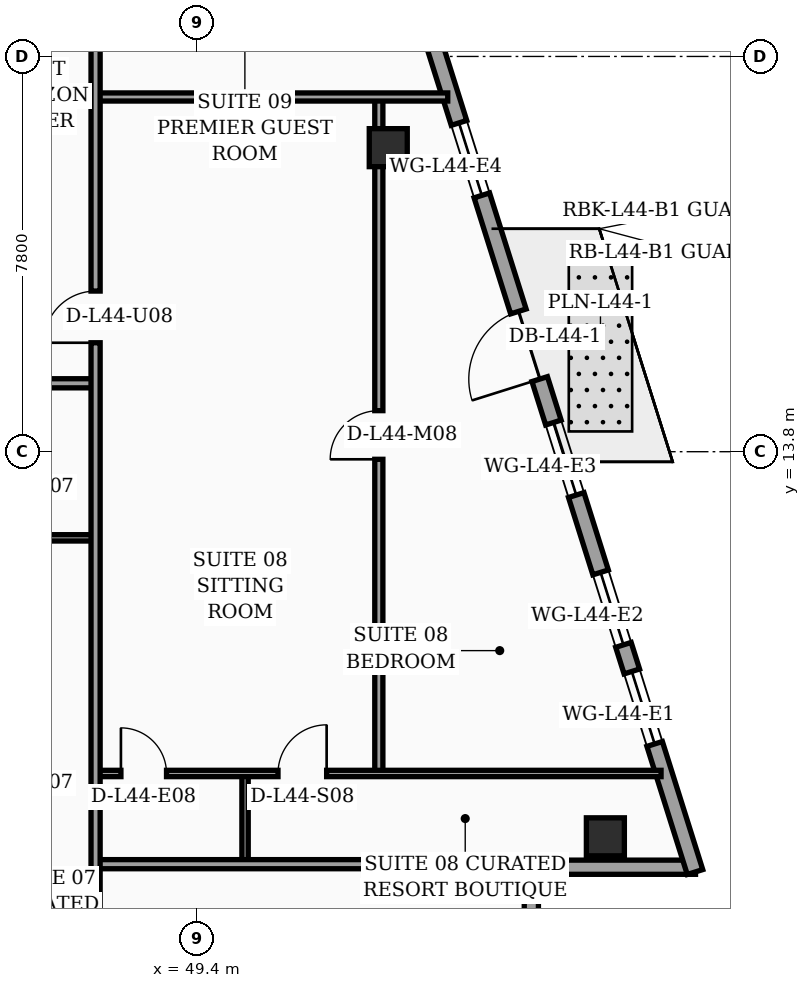
"""IFC4 building model, lengths in metres.
Left out: names, types, materials, properties, quantities, classifications, styles, units other than length and angle.
Written with IfcOpenShell. Run it as: python <this file> out.ifc"""

import sys

from ifc_helpers import new_model, si_unit, direction, frame, frame_2d, origin, origin_2d, place, context, subcontext, project, spatial, rectangle, hollow_rectangle, extrude, element, fill, save


model = new_model("IFC4")
c1 = context("Model", 3, precision=1e-05, world=origin(), true_north=direction((0.0, 1.0)))
c2 = subcontext(c1, "Body", "Model", "MODEL_VIEW")
j1 = project(units=[si_unit("LENGTHUNIT", "METRE"), si_unit("PLANEANGLEUNIT", "RADIAN")], contexts=[c1])
p1 = place(None, origin())
s1 = spatial("IfcSite", under=j1, at=p1, CompositionType="ELEMENT")
p2 = place(p1, origin())
s2 = spatial("IfcBuilding", under=s1, at=p2, CompositionType="ELEMENT")
p3 = place(p2, frame((0.0, 0.0, 178.9)))
s3 = spatial("IfcBuildingStorey", under=s2, at=p3, CompositionType="ELEMENT", Elevation=178.9)
for number, where, z_axis, x_axis in (
    (1, (57.461, 6.2, 0.0), (0.0, 0.0, 1.0), (1.0, 0.0, 0.0)),
    (2, (53.176, 19.8, 0.0), (0.0, 0.0, 1.0), (1.0, 0.0, 0.0)),
):
    element("IfcColumn", number, at=place(p3, frame(where, z_axis=z_axis, x_axis=x_axis)), inside=s3, PredefinedType="COLUMN", context=c2, shape_type="SweptSolid", body=[
        extrude(hollow_rectangle(XDim=0.75, YDim=0.75, WallThickness=0.032, at=origin_2d()), origin(), (0.0, 0.0, 1.0), 3.56),
    ])
p4 = place(p3, frame((56.0, 2.52, 0.0), z_axis=(0.0, 0.0, 1.0), x_axis=(0.0, 1.0, 0.0)))
e3 = element("IfcWall", 3, at=p4, inside=s3, PredefinedType="SOLIDWALL", context=c2, shape_type="SweptSolid", body=[
    extrude(rectangle(XDim=2.94, YDim=0.28, at=frame_2d((1.47, 0.0))), origin(), (0.0, 0.0, 1.0), 3.04),
])
p5 = place(p3, frame((55.86, 5.6, 0.0), z_axis=(0.0, 0.0, 1.0), x_axis=(1.0, 0.0, 0.0)))
e4 = element("IfcWall", 4, at=p5, inside=s3, PredefinedType="SOLIDWALL", context=c2, shape_type="SweptSolid", body=[
    extrude(rectangle(XDim=3.38, YDim=0.28, at=frame_2d((1.69, 0.0))), origin(), (0.0, 0.0, 1.0), 3.04),
])
p6 = place(p3, frame((59.23, 5.505, 0.0), z_axis=(0.0, 0.0, 1.0), x_axis=(-0.300509063924, 0.953778958931, 0.0)))
e5 = element("IfcWall", 5, at=p6, inside=s3, PredefinedType="SOLIDWALL", context=c2, shape_type="SweptSolid", body=[
    extrude(rectangle(XDim=30.814, YDim=0.32, at=frame_2d((15.407, 0.0))), origin(), (0.0, 0.0, 1.0), 3.56),
])
p7 = place(p6, frame((10.199, 0.0, 0.0)))
e6 = element("IfcOpeningElement", 6, at=p7, cuts=e5, PredefinedType="OPENING", context=c2, shape_type="SweptSolid", body=[
    extrude(rectangle(XDim=1.4, YDim=2.25, at=frame_2d((0.7, 1.125))), frame((0.0, 0.17, 0.0), z_axis=(0.0, -1.0, 0.0), x_axis=(1.0, 0.0, 0.0)), (0.0, 0.0, 1.0), 0.34),
])
p8 = place(p6, frame((2.65, 0.0, 0.75)))
e7 = element("IfcOpeningElement", 7, at=p8, cuts=e5, PredefinedType="OPENING", context=c2, shape_type="SweptSolid", body=[
    extrude(rectangle(XDim=1.5, YDim=1.6, at=frame_2d((0.75, 0.8))), frame((0.0, 0.17, 0.0), z_axis=(0.0, -1.0, 0.0), x_axis=(1.0, 0.0, 0.0)), (0.0, 0.0, 1.0), 0.34),
])
p9 = place(p6, frame((4.7, 0.0, 0.75)))
e8 = element("IfcOpeningElement", 8, at=p9, cuts=e5, PredefinedType="OPENING", context=c2, shape_type="SweptSolid", body=[
    extrude(rectangle(XDim=1.5, YDim=1.6, at=frame_2d((0.75, 0.8))), frame((0.0, 0.17, 0.0), z_axis=(0.0, -1.0, 0.0), x_axis=(1.0, 0.0, 0.0)), (0.0, 0.0, 1.0), 0.34),
])
p10 = place(p6, frame((7.8, 0.0, 0.75)))
e9 = element("IfcOpeningElement", 9, at=p10, cuts=e5, PredefinedType="OPENING", context=c2, shape_type="SweptSolid", body=[
    extrude(rectangle(XDim=1.5, YDim=1.6, at=frame_2d((0.75, 0.8))), frame((0.0, 0.17, 0.0), z_axis=(0.0, -1.0, 0.0), x_axis=(1.0, 0.0, 0.0)), (0.0, 0.0, 1.0), 0.34),
])
p11 = place(p6, frame((14.0, 0.0, 0.75)))
e10 = element("IfcOpeningElement", 10, at=p11, cuts=e5, PredefinedType="OPENING", context=c2, shape_type="SweptSolid", body=[
    extrude(rectangle(XDim=1.5, YDim=1.6, at=frame_2d((0.75, 0.8))), frame((0.0, 0.17, 0.0), z_axis=(0.0, -1.0, 0.0), x_axis=(1.0, 0.0, 0.0)), (0.0, 0.0, 1.0), 0.34),
])
p12 = place(p6, frame((17.1, 0.0, 0.75)))
e11 = element("IfcOpeningElement", 11, at=p12, cuts=e5, PredefinedType="OPENING", context=c2, shape_type="SweptSolid", body=[
    extrude(rectangle(XDim=1.5, YDim=1.6, at=frame_2d((0.75, 0.8))), frame((0.0, 0.17, 0.0), z_axis=(0.0, -1.0, 0.0), x_axis=(1.0, 0.0, 0.0)), (0.0, 0.0, 1.0), 0.34),
])
p13 = place(p6, frame((20.2, 0.0, 0.75)))
e12 = element("IfcOpeningElement", 12, at=p13, cuts=e5, PredefinedType="OPENING", context=c2, shape_type="SweptSolid", body=[
    extrude(rectangle(XDim=1.5, YDim=1.6, at=frame_2d((0.75, 0.8))), frame((0.0, 0.17, 0.0), z_axis=(0.0, -1.0, 0.0), x_axis=(1.0, 0.0, 0.0)), (0.0, 0.0, 1.0), 0.34),
])
p14 = place(p6, frame((26.4, 0.0, 0.75)))
e13 = element("IfcOpeningElement", 13, at=p14, cuts=e5, PredefinedType="OPENING", context=c2, shape_type="SweptSolid", body=[
    extrude(rectangle(XDim=1.5, YDim=1.6, at=frame_2d((0.75, 0.8))), frame((0.0, 0.17, 0.0), z_axis=(0.0, -1.0, 0.0), x_axis=(1.0, 0.0, 0.0)), (0.0, 0.0, 1.0), 0.34),
])
p15 = place(p3, frame((45.47, 12.1, 0.0), z_axis=(0.0, 0.0, 1.0), x_axis=(1.0, 0.0, 0.0)))
e14 = element("IfcWall", 14, at=p15, inside=s3, PredefinedType="PARTITIONING", context=c2, shape_type="SweptSolid", body=[
    extrude(rectangle(XDim=1.93, YDim=0.125, at=frame_2d((0.965, 0.0))), origin(), (0.0, 0.0, 1.0), 2.94),
])
p16 = place(p3, frame((32.4, 15.15, 0.0), z_axis=(0.0, 0.0, 1.0), x_axis=(1.0, 0.0, 0.0)))
e15 = element("IfcWall", 15, at=p16, inside=s3, PredefinedType="PARTITIONING", context=c2, shape_type="SweptSolid", body=[
    extrude(rectangle(XDim=15.0, YDim=0.18, at=frame_2d((7.5, 0.0))), origin(), (0.0, 0.0, 1.0), 2.94),
])
p17 = place(p16, frame((1.66, 0.0, 0.0)))
e16 = element("IfcOpeningElement", 16, at=p17, cuts=e15, PredefinedType="OPENING", context=c2, shape_type="SweptSolid", body=[
    extrude(rectangle(XDim=1.02, YDim=2.2, at=frame_2d((0.51, 1.1))), frame((0.0, 0.1, 0.0), z_axis=(0.0, -1.0, 0.0), x_axis=(1.0, 0.0, 0.0)), (0.0, 0.0, 1.0), 0.2),
])
p18 = place(p16, frame((10.79, 0.0, 0.0)))
e17 = element("IfcOpeningElement", 17, at=p18, cuts=e15, PredefinedType="OPENING", context=c2, shape_type="SweptSolid", body=[
    extrude(rectangle(XDim=1.02, YDim=2.2, at=frame_2d((0.51, 1.1))), frame((0.0, 0.1, 0.0), z_axis=(0.0, -1.0, 0.0), x_axis=(1.0, 0.0, 0.0)), (0.0, 0.0, 1.0), 0.2),
])
p19 = place(p16, frame((6.62, 0.0, 0.0)))
e18 = element("IfcOpeningElement", 18, at=p19, cuts=e15, PredefinedType="OPENING", context=c2, shape_type="SweptSolid", body=[
    extrude(rectangle(XDim=1.02, YDim=2.2, at=frame_2d((0.51, 1.1))), frame((0.0, 0.1, 0.0), z_axis=(0.0, -1.0, 0.0), x_axis=(1.0, 0.0, 0.0)), (0.0, 0.0, 1.0), 0.2),
])
p20 = place(p3, frame((50.35, 5.66, 0.0), z_axis=(0.0, 0.0, 1.0), x_axis=(0.0, 1.0, 0.0)))
e19 = element("IfcWall", 19, at=p20, inside=s3, PredefinedType="PARTITIONING", context=c2, shape_type="SweptSolid", body=[
    extrude(rectangle(XDim=1.79, YDim=0.125, at=frame_2d((0.895, 0.0))), origin(), (0.0, 0.0, 1.0), 3.56),
])
p21 = place(p3, frame((52.99, 7.45, 0.0), z_axis=(0.0, 0.0, 1.0), x_axis=(0.0, 1.0, 0.0)))
e20 = element("IfcWall", 20, at=p21, inside=s3, PredefinedType="PARTITIONING", context=c2, shape_type="SweptSolid", body=[
    extrude(rectangle(XDim=13.35, YDim=0.16, at=frame_2d((6.675, 0.0))), origin(), (0.0, 0.0, 1.0), 2.94),
])
p22 = place(p21, frame((6.2, 0.0, 0.0)))
e21 = element("IfcOpeningElement", 21, at=p22, cuts=e20, PredefinedType="OPENING", context=c2, shape_type="SweptSolid", body=[
    extrude(rectangle(XDim=0.96, YDim=2.2, at=frame_2d((0.48, 1.1))), frame((0.0, 0.09, 0.0), z_axis=(0.0, -1.0, 0.0), x_axis=(1.0, 0.0, 0.0)), (0.0, 0.0, 1.0), 0.18),
])
p23 = place(p3, frame((47.4, 7.45, 0.0), z_axis=(0.0, 0.0, 1.0), x_axis=(1.0, 0.0, 0.0)))
e22 = element("IfcWall", 22, at=p23, inside=s3, PredefinedType="PARTITIONING", context=c2, shape_type="SweptSolid", body=[
    extrude(rectangle(XDim=11.16, YDim=0.125, at=frame_2d((5.58, 0.0))), origin(), (0.0, 0.0, 1.0), 2.94),
])
p24 = place(p23, frame((0.5, 0.0, 0.0)))
e23 = element("IfcOpeningElement", 23, at=p24, cuts=e22, PredefinedType="OPENING", context=c2, shape_type="SweptSolid", body=[
    extrude(rectangle(XDim=0.9, YDim=2.15, at=frame_2d((0.45, 1.075))), frame((0.0, 0.073, 0.0), z_axis=(0.0, -1.0, 0.0), x_axis=(1.0, 0.0, 0.0)), (0.0, 0.0, 1.0), 0.145),
])
p25 = place(p23, frame((3.6, 0.0, 0.0)))
e24 = element("IfcOpeningElement", 24, at=p25, cuts=e22, PredefinedType="OPENING", context=c2, shape_type="SweptSolid", body=[
    extrude(rectangle(XDim=0.96, YDim=2.2, at=frame_2d((0.48, 1.1))), frame((0.0, 0.073, 0.0), z_axis=(0.0, -1.0, 0.0), x_axis=(1.0, 0.0, 0.0)), (0.0, 0.0, 1.0), 0.145),
])
p26 = place(p3, frame((47.4, 5.66, 0.0), z_axis=(0.0, 0.0, 1.0), x_axis=(1.0, 0.0, 0.0)))
e25 = element("IfcWall", 25, at=p26, inside=s3, PredefinedType="PARTITIONING", context=c2, shape_type="SweptSolid", body=[
    extrude(rectangle(XDim=8.6, YDim=0.18, at=frame_2d((4.3, 0.0))), origin(), (0.0, 0.0, 1.0), 2.94),
])
p27 = place(p3, frame((47.4, 20.8, 0.0), z_axis=(0.0, 0.0, 1.0), x_axis=(1.0, 0.0, 0.0)))
e26 = element("IfcWall", 26, at=p27, inside=s3, PredefinedType="PARTITIONING", context=c2, shape_type="SweptSolid", body=[
    extrude(rectangle(XDim=6.95, YDim=0.16, at=frame_2d((3.475, 0.0))), origin(), (0.0, 0.0, 1.0), 3.04),
])
p28 = place(p3, frame((47.4, 2.44, 0.0), z_axis=(0.0, 0.0, 1.0), x_axis=(0.0, 1.0, 0.0)))
e27 = element("IfcWall", 27, at=p28, inside=s3, PredefinedType="PARTITIONING", context=c2, shape_type="SweptSolid", body=[
    extrude(rectangle(XDim=27.84, YDim=0.18, at=frame_2d((13.92, 0.0))), origin(), (0.0, 0.0, 1.0), 2.94),
])
p29 = place(p28, frame((13.51, 0.0, 0.0)))
e28 = element("IfcOpeningElement", 28, at=p29, cuts=e27, PredefinedType="OPENING", context=c2, shape_type="SweptSolid", body=[
    extrude(rectangle(XDim=1.02, YDim=2.2, at=frame_2d((0.51, 1.1))), frame((0.0, 0.1, 0.0), z_axis=(0.0, -1.0, 0.0), x_axis=(1.0, 0.0, 0.0)), (0.0, 0.0, 1.0), 0.2),
])
p30 = place(p28, frame((21.52, 0.0, 0.0)))
e29 = element("IfcOpeningElement", 29, at=p30, cuts=e27, PredefinedType="OPENING", context=c2, shape_type="SweptSolid", body=[
    extrude(rectangle(XDim=1.02, YDim=2.2, at=frame_2d((0.51, 1.1))), frame((0.0, 0.1, 0.0), z_axis=(0.0, -1.0, 0.0), x_axis=(1.0, 0.0, 0.0)), (0.0, 0.0, 1.0), 0.2),
])
p31 = place(p7, origin())
e30 = element("IfcDoor", 30, at=p31, inside=s3, OperationType="SINGLE_SWING_LEFT", PredefinedType="DOOR", context=c2, shape_type="SweptSolid", body=[
    extrude(rectangle(XDim=1.4, YDim=2.25, at=frame_2d((0.7, 1.125))), frame((0.0, 0.025, 0.0), z_axis=(0.0, -1.0, 0.0), x_axis=(1.0, 0.0, 0.0)), (0.0, 0.0, 1.0), 0.05),
])
fill(e6, e30)
p32 = place(p8, origin())
e31 = element("IfcWindow", 31, at=p32, inside=s3, PartitioningType="SINGLE_PANEL", PredefinedType="WINDOW", context=c2, shape_type="SweptSolid", body=[
    extrude(rectangle(XDim=1.5, YDim=1.6, at=frame_2d((0.75, 0.8))), frame((0.0, 0.03, 0.0), z_axis=(0.0, -1.0, 0.0), x_axis=(1.0, 0.0, 0.0)), (0.0, 0.0, 1.0), 0.06),
])
fill(e7, e31)
p33 = place(p9, origin())
e32 = element("IfcWindow", 32, at=p33, inside=s3, PartitioningType="SINGLE_PANEL", PredefinedType="WINDOW", context=c2, shape_type="SweptSolid", body=[
    extrude(rectangle(XDim=1.5, YDim=1.6, at=frame_2d((0.75, 0.8))), frame((0.0, 0.03, 0.0), z_axis=(0.0, -1.0, 0.0), x_axis=(1.0, 0.0, 0.0)), (0.0, 0.0, 1.0), 0.06),
])
fill(e8, e32)
p34 = place(p10, origin())
e33 = element("IfcWindow", 33, at=p34, inside=s3, PartitioningType="SINGLE_PANEL", PredefinedType="WINDOW", context=c2, shape_type="SweptSolid", body=[
    extrude(rectangle(XDim=1.5, YDim=1.6, at=frame_2d((0.75, 0.8))), frame((0.0, 0.03, 0.0), z_axis=(0.0, -1.0, 0.0), x_axis=(1.0, 0.0, 0.0)), (0.0, 0.0, 1.0), 0.06),
])
fill(e9, e33)
p35 = place(p11, origin())
e34 = element("IfcWindow", 34, at=p35, inside=s3, PartitioningType="SINGLE_PANEL", PredefinedType="WINDOW", context=c2, shape_type="SweptSolid", body=[
    extrude(rectangle(XDim=1.5, YDim=1.6, at=frame_2d((0.75, 0.8))), frame((0.0, 0.03, 0.0), z_axis=(0.0, -1.0, 0.0), x_axis=(1.0, 0.0, 0.0)), (0.0, 0.0, 1.0), 0.06),
])
fill(e10, e34)
p36 = place(p22, origin())
e35 = element("IfcDoor", 35, at=p36, inside=s3, OperationType="SINGLE_SWING_LEFT", PredefinedType="DOOR", context=c2, shape_type="SweptSolid", body=[
    extrude(rectangle(XDim=0.96, YDim=2.2, at=frame_2d((0.48, 1.1))), frame((0.0, 0.025, 0.0), z_axis=(0.0, -1.0, 0.0), x_axis=(1.0, 0.0, 0.0)), (0.0, 0.0, 1.0), 0.05),
])
fill(e21, e35)
p37 = place(p24, origin())
e36 = element("IfcDoor", 36, at=p37, inside=s3, OperationType="SINGLE_SWING_LEFT", PredefinedType="DOOR", context=c2, shape_type="SweptSolid", body=[
    extrude(rectangle(XDim=0.9, YDim=2.15, at=frame_2d((0.45, 1.075))), frame((0.0, 0.025, 0.0), z_axis=(0.0, -1.0, 0.0), x_axis=(1.0, 0.0, 0.0)), (0.0, 0.0, 1.0), 0.05),
])
fill(e23, e36)
p38 = place(p25, origin())
e37 = element("IfcDoor", 37, at=p38, inside=s3, OperationType="SINGLE_SWING_RIGHT", PredefinedType="DOOR", context=c2, shape_type="SweptSolid", body=[
    extrude(rectangle(XDim=0.96, YDim=2.2, at=frame_2d((0.48, 1.1))), frame((0.0, 0.025, 0.0), z_axis=(0.0, -1.0, 0.0), x_axis=(1.0, 0.0, 0.0)), (0.0, 0.0, 1.0), 0.05),
])
fill(e24, e37)
p39 = place(p29, origin())
e38 = element("IfcDoor", 38, at=p39, inside=s3, OperationType="SINGLE_SWING_LEFT", PredefinedType="DOOR", context=c2, shape_type="SweptSolid", body=[
    extrude(rectangle(XDim=1.02, YDim=2.2, at=frame_2d((0.51, 1.1))), frame((0.0, 0.025, 0.0), z_axis=(0.0, -1.0, 0.0), x_axis=(1.0, 0.0, 0.0)), (0.0, 0.0, 1.0), 0.05),
])
fill(e28, e38)
save(model, sys.argv[1])
